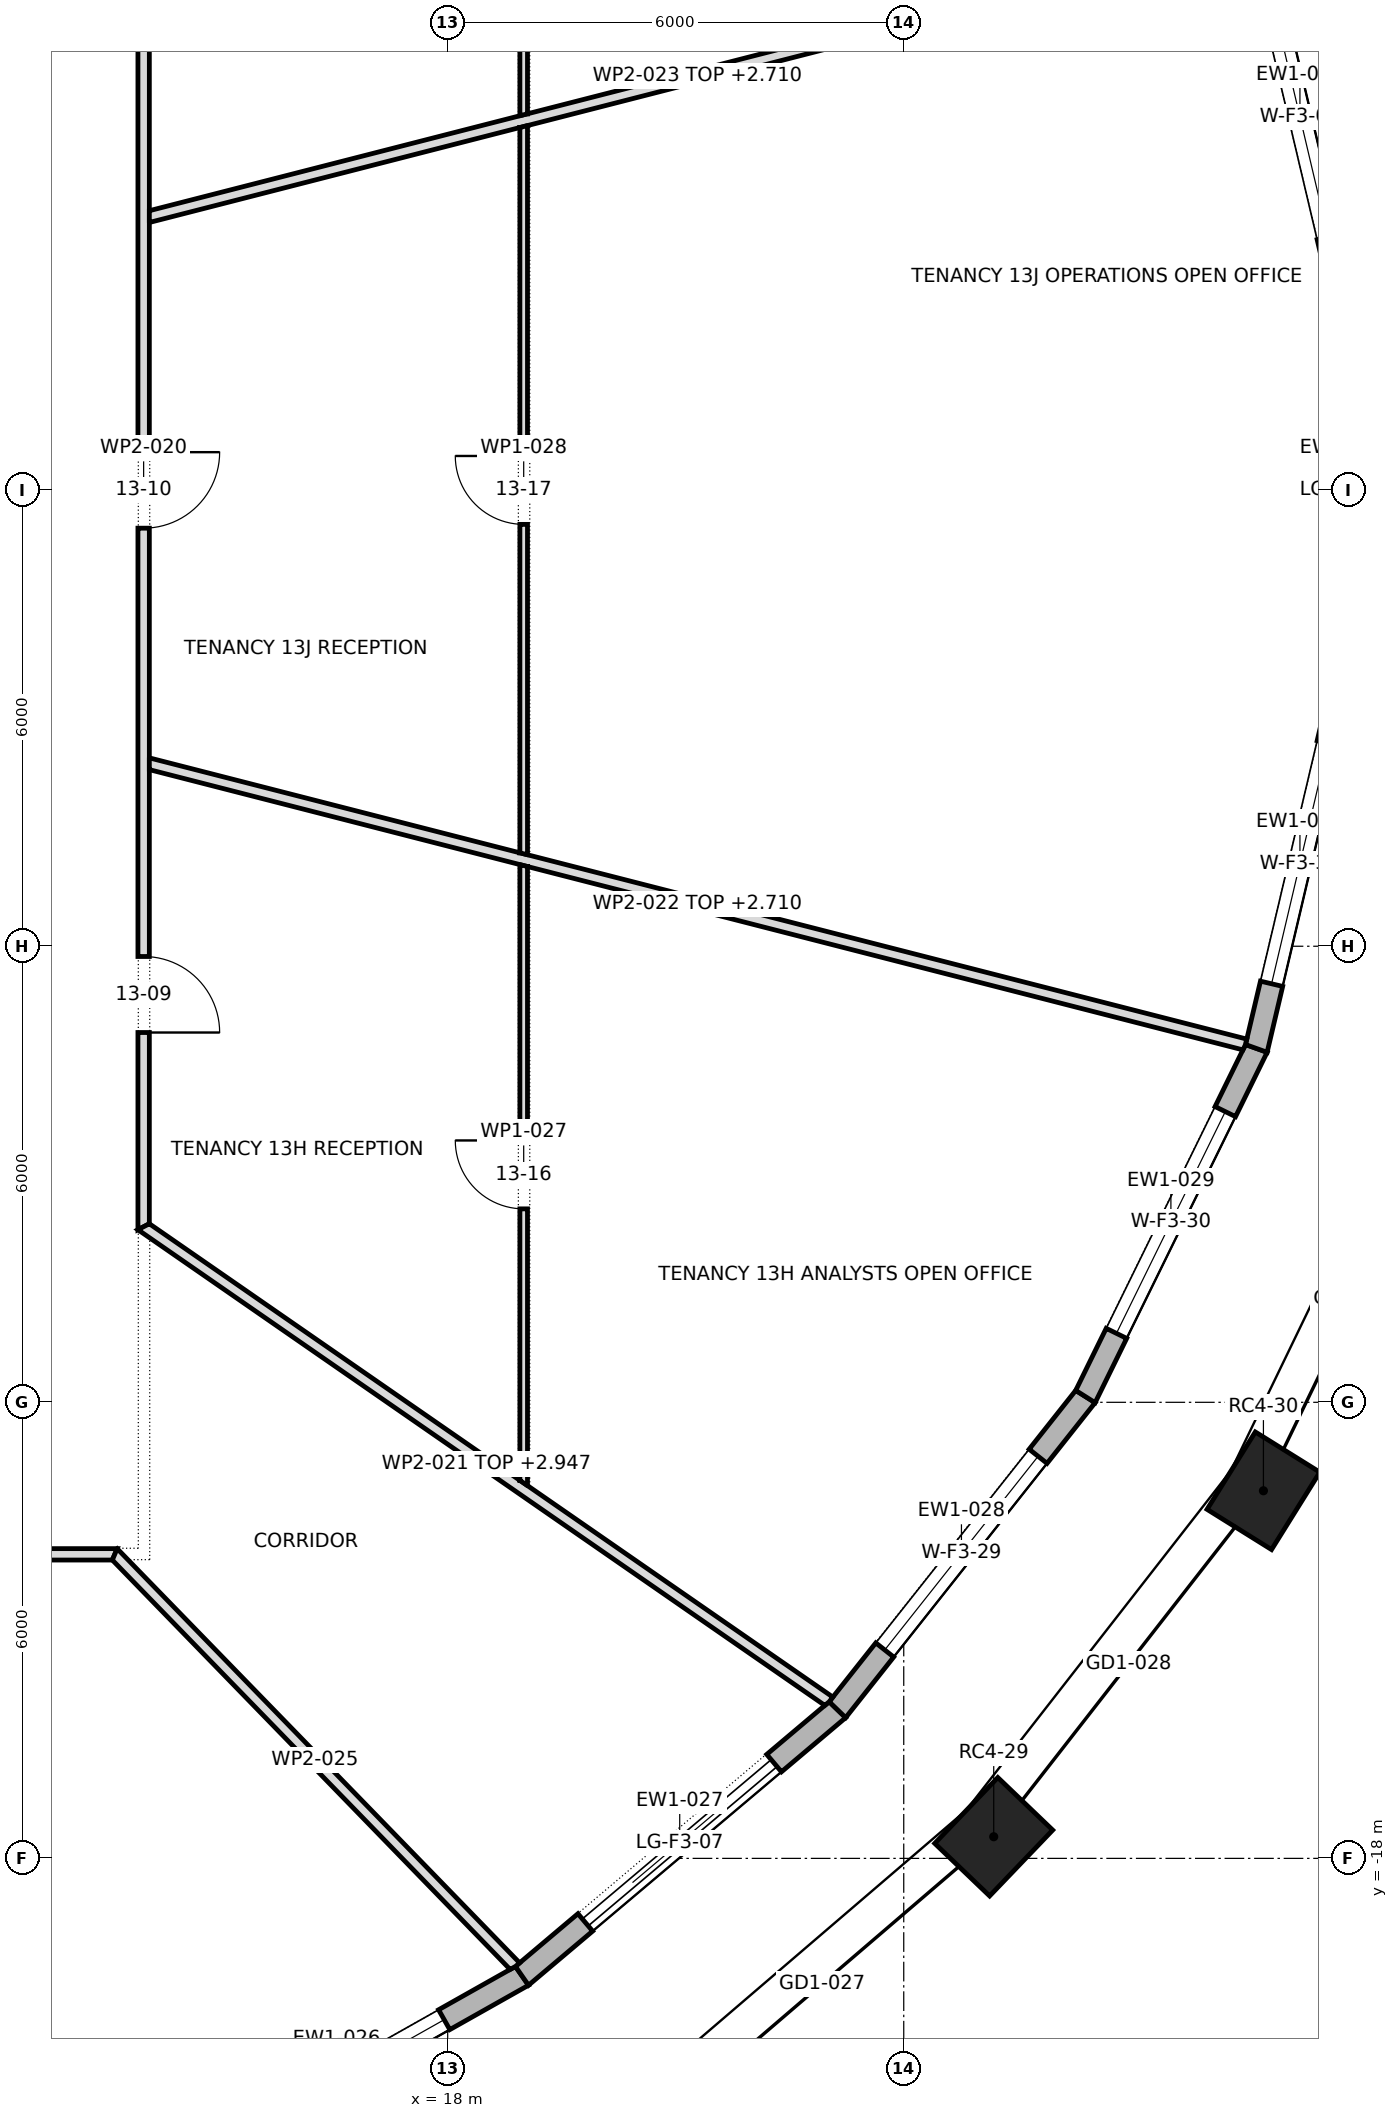
"""IFC4 building model, lengths in metres.
Left out: names, types, materials, properties, quantities, classifications, styles, units other than length and angle.
Written with IfcOpenShell. Run it as: python <this file> out.ifc"""

import sys

from ifc_helpers import new_model, si_unit, direction, frame, frame_2d, origin, origin_2d, place, context, subcontext, project, spatial, polyline, rectangle, outline, extrude, element, fill, save


model = new_model("IFC4")
c1 = context("Model", 3, precision=1e-05, world=origin(), true_north=direction((0.0, 1.0)))
c2 = subcontext(c1, "Body", "Model", "MODEL_VIEW")
j1 = project(units=[si_unit("LENGTHUNIT", "METRE"), si_unit("PLANEANGLEUNIT", "RADIAN")], contexts=[c1])
p1 = place(None, origin())
s1 = spatial("IfcSite", under=j1, at=p1, CompositionType="ELEMENT")
p2 = place(p1, origin())
s2 = spatial("IfcBuilding", under=s1, at=p2, CompositionType="ELEMENT")
p3 = place(p2, frame((0.0, 0.0, 190.9)))
s3 = spatial("IfcBuildingStorey", under=s2, at=p3, CompositionType="ELEMENT", Elevation=190.9)
for number, where, z_axis, x_axis in (
    (1, (25.184, -17.715, 0.0), (0.0, 0.0, 1.0), (0.692, 0.722, 0.0)),
    (2, (28.732, -13.164, 0.0), (0.0, 0.0, 1.0), (0.529, 0.849, 0.0)),
):
    element("IfcColumn", number, at=place(p3, frame(where, z_axis=z_axis, x_axis=x_axis)), inside=s3, PredefinedType="COLUMN", context=c2, shape_type="SweptSolid", body=[
        extrude(rectangle(XDim=1.2, YDim=1.0, at=origin_2d()), origin(), (0.0, 0.0, 1.0), 4.0),
    ])
p4 = place(p3, frame((29.785, 2.48, 0.0), z_axis=(0.0, 0.0, 1.0), x_axis=(-0.229455912692, 0.97331905567, 0.0)))
e3 = element("IfcWall", 3, at=p4, inside=s3, PredefinedType="STANDARD", context=c2, shape_type="SweptSolid", body=[
    extrude(outline(polyline([(-0.017, -0.15), (5.014, -0.15), (4.981, 0.15), (0.017, 0.15), (-0.017, -0.15)])), origin(), (0.0, 0.0, 1.0), 3.7),
])
p5 = place(p4, frame((0.874, 0.0, 0.6)))
e4 = element("IfcOpeningElement", 4, at=p5, cuts=e3, PredefinedType="OPENING", context=c2, shape_type="SweptSolid", body=[
    extrude(rectangle(XDim=3.25, YDim=2.65, at=frame_2d((1.625, 1.325))), frame((0.0, 0.162, 0.0), z_axis=(0.0, -1.0, 0.0), x_axis=(1.0, 0.0, 0.0)), (0.0, 0.0, 1.0), 0.324),
])
p6 = place(p3, frame((14.1, -22.295, 0.0), z_axis=(0.0, 0.0, 1.0), x_axis=(0.871083701819, 0.491134588912, 0.0)))
e5 = element("IfcWall", 5, at=p6, inside=s3, PredefinedType="STANDARD", context=c2, shape_type="SweptSolid", body=[
    extrude(outline(polyline([(-0.013, -0.15), (5.614, -0.15), (5.585, 0.15), (0.013, 0.15), (-0.013, -0.15)])), origin(), (0.0, 0.0, 1.0), 3.7),
])
p7 = place(p6, frame((1.175, 0.0, 0.6)))
e6 = element("IfcOpeningElement", 6, at=p7, cuts=e5, PredefinedType="OPENING", context=c2, shape_type="SweptSolid", body=[
    extrude(rectangle(XDim=3.25, YDim=2.65, at=frame_2d((1.625, 1.325))), frame((0.0, 0.162, 0.0), z_axis=(0.0, -1.0, 0.0), x_axis=(1.0, 0.0, 0.0)), (0.0, 0.0, 1.0), 0.324),
])
p8 = place(p3, frame((18.977, -19.545, 0.0), z_axis=(0.0, 0.0, 1.0), x_axis=(0.764330261608, 0.644824977176, 0.0)))
e7 = element("IfcWall", 7, at=p8, inside=s3, PredefinedType="STANDARD", context=c2, shape_type="SweptSolid", body=[
    extrude(outline(polyline([(-0.014, -0.15), (5.445, -0.15), (5.415, 0.15), (0.014, 0.15), (-0.014, -0.15)])), origin(), (0.0, 0.0, 1.0), 3.7),
])
p9 = place(p8, frame((1.09, 0.0, 0.0)))
e8 = element("IfcOpeningElement", 8, at=p9, cuts=e7, PredefinedType="OPENING", context=c2, shape_type="SweptSolid", body=[
    extrude(rectangle(XDim=3.25, YDim=3.25, at=frame_2d((1.625, 1.625))), frame((0.0, 0.162, 0.0), z_axis=(0.0, -1.0, 0.0), x_axis=(1.0, 0.0, 0.0)), (0.0, 0.0, 1.0), 0.324),
])
p10 = place(p3, frame((23.128, -16.044, 0.0), z_axis=(0.0, 0.0, 1.0), x_axis=(0.620829074232, 0.783945955145, 0.0)))
e9 = element("IfcWall", 9, at=p10, inside=s3, PredefinedType="STANDARD", context=c2, shape_type="SweptSolid", body=[
    extrude(outline(polyline([(-0.015, -0.15), (5.271, -0.15), (5.239, 0.15), (0.015, 0.15), (-0.015, -0.15)])), origin(), (0.0, 0.0, 1.0), 3.7),
])
p11 = place(p10, frame((1.003, 0.0, 0.6)))
e10 = element("IfcOpeningElement", 10, at=p11, cuts=e9, PredefinedType="OPENING", context=c2, shape_type="SweptSolid", body=[
    extrude(rectangle(XDim=3.25, YDim=2.65, at=frame_2d((1.625, 1.325))), frame((0.0, 0.162, 0.0), z_axis=(0.0, -1.0, 0.0), x_axis=(1.0, 0.0, 0.0)), (0.0, 0.0, 1.0), 0.324),
])
p12 = place(p3, frame((26.39, -11.924, 0.0), z_axis=(0.0, 0.0, 1.0), x_axis=(0.440694221881, 0.897657285829, 0.0)))
e11 = element("IfcWall", 11, at=p12, inside=s3, PredefinedType="STANDARD", context=c2, shape_type="SweptSolid", body=[
    extrude(outline(polyline([(-0.016, -0.15), (5.119, -0.15), (5.085, 0.15), (0.016, 0.15), (-0.016, -0.15)])), origin(), (0.0, 0.0, 1.0), 3.7),
])
p13 = place(p12, frame((0.926, 0.0, 0.6)))
e12 = element("IfcOpeningElement", 12, at=p13, cuts=e11, PredefinedType="OPENING", context=c2, shape_type="SweptSolid", body=[
    extrude(rectangle(XDim=3.25, YDim=2.65, at=frame_2d((1.625, 1.325))), frame((0.0, 0.162, 0.0), z_axis=(0.0, -1.0, 0.0), x_axis=(1.0, 0.0, 0.0)), (0.0, 0.0, 1.0), 0.324),
])
p14 = place(p3, frame((28.639, -7.344, 0.0), z_axis=(0.0, 0.0, 1.0), x_axis=(0.229455912692, 0.97331905567, 0.0)))
e13 = element("IfcWall", 13, at=p14, inside=s3, PredefinedType="STANDARD", context=c2, shape_type="SweptSolid", body=[
    extrude(outline(polyline([(-0.017, -0.15), (5.015, -0.15), (4.98, 0.15), (0.017, 0.15), (-0.017, -0.15)])), origin(), (0.0, 0.0, 1.0), 3.7),
])
p15 = place(p14, frame((0.874, 0.0, 0.6)))
e14 = element("IfcOpeningElement", 14, at=p15, cuts=e13, PredefinedType="OPENING", context=c2, shape_type="SweptSolid", body=[
    extrude(rectangle(XDim=3.25, YDim=2.65, at=frame_2d((1.625, 1.325))), frame((0.0, 0.162, 0.0), z_axis=(0.0, -1.0, 0.0), x_axis=(1.0, 0.0, 0.0)), (0.0, 0.0, 1.0), 0.324),
])
p16 = place(p3, frame((-1.63, -14.0, 0.0), z_axis=(0.0, 0.0, 1.0), x_axis=(1.0, 0.0, 0.0)))
e15 = element("IfcWall", 15, at=p16, inside=s3, PredefinedType="PARTITIONING", context=c2, shape_type="SweptSolid", body=[
    extrude(outline(polyline([(0.0, -0.075), (1.902, -0.075), (3.804, -0.075), (5.707, -0.075), (7.609, -0.075), (9.511, -0.075), (11.414, -0.075), (13.316, -0.075), (15.218, -0.075), (15.281, 0.075), (15.281, 0.075), (13.371, 0.075), (11.461, 0.075), (9.551, 0.075), (7.641, 0.075), (5.73, 0.075), (3.82, 0.075), (1.91, 0.075), (0.0, 0.075), (0.0, -0.075)])), origin(), (0.0, 0.0, 1.0), 3.7),
])
p17 = place(p16, frame((2.83, 0.0, 0.0)))
e16 = element("IfcOpeningElement", 16, at=p17, cuts=e15, PredefinedType="OPENING", context=c2, shape_type="SweptSolid", body=[
    extrude(rectangle(XDim=1.0, YDim=2.1, at=frame_2d((0.5, 1.05))), frame((0.0, 0.087, 0.0), z_axis=(0.0, -1.0, 0.0), x_axis=(1.0, 0.0, 0.0)), (0.0, 0.0, 1.0), 0.174),
])
p18 = place(p16, frame((10.455, 0.0, 0.0)))
e17 = element("IfcOpeningElement", 17, at=p18, cuts=e15, PredefinedType="OPENING", context=c2, shape_type="SweptSolid", body=[
    extrude(rectangle(XDim=1.0, YDim=2.1, at=frame_2d((0.5, 1.05))), frame((0.0, 0.087, 0.0), z_axis=(0.0, -1.0, 0.0), x_axis=(1.0, 0.0, 0.0)), (0.0, 0.0, 1.0), 0.174),
])
p19 = place(p3, frame((14.0, -9.729, 0.0), z_axis=(0.0, 0.0, 1.0), x_axis=(0.0, 1.0, 0.0)))
e18 = element("IfcWall", 18, at=p19, inside=s3, PredefinedType="PARTITIONING", context=c2, shape_type="SweptSolid", body=[
    extrude(outline(polyline([(0.079, -0.075), (2.009, -0.075), (3.939, -0.075), (5.869, -0.075), (7.799, -0.075), (9.729, -0.075), (11.659, -0.075), (13.59, -0.075), (15.52, -0.075), (17.45, -0.075), (19.38, -0.075), (19.458, 0.075), (19.458, 0.075), (17.513, 0.075), (15.567, 0.075), (13.621, 0.075), (11.675, 0.075), (9.729, 0.075), (7.783, 0.075), (5.838, 0.075), (3.892, 0.075), (1.946, 0.075), (0.0, 0.075), (0.0, 0.075), (0.079, -0.075)])), origin(), (0.0, 0.0, 1.0), 3.7),
])
p20 = place(p19, frame((2.594, 0.0, 0.0)))
e19 = element("IfcOpeningElement", 19, at=p20, cuts=e18, PredefinedType="OPENING", context=c2, shape_type="SweptSolid", body=[
    extrude(rectangle(XDim=1.0, YDim=2.1, at=frame_2d((0.5, 1.05))), frame((0.0, 0.087, 0.0), z_axis=(0.0, -1.0, 0.0), x_axis=(1.0, 0.0, 0.0)), (0.0, 0.0, 1.0), 0.174),
])
p21 = place(p19, frame((9.229, 0.0, 0.0)))
e20 = element("IfcOpeningElement", 20, at=p21, cuts=e18, PredefinedType="OPENING", context=c2, shape_type="SweptSolid", body=[
    extrude(rectangle(XDim=1.0, YDim=2.1, at=frame_2d((0.5, 1.05))), frame((0.0, 0.087, 0.0), z_axis=(0.0, -1.0, 0.0), x_axis=(1.0, 0.0, 0.0)), (0.0, 0.0, 1.0), 0.174),
])
p22 = place(p19, frame((15.864, 0.0, 0.0)))
e21 = element("IfcOpeningElement", 21, at=p22, cuts=e18, PredefinedType="OPENING", context=c2, shape_type="SweptSolid", body=[
    extrude(rectangle(XDim=1.0, YDim=2.1, at=frame_2d((0.5, 1.05))), frame((0.0, 0.087, 0.0), z_axis=(0.0, -1.0, 0.0), x_axis=(1.0, 0.0, 0.0)), (0.0, 0.0, 1.0), 0.174),
])
p23 = place(p3, frame((13.968, -9.667, 0.0), z_axis=(0.0, 0.0, 1.0), x_axis=(0.822097241007, -0.569347105313, 0.0)))
e22 = element("IfcWall", 22, at=p23, inside=s3, PredefinedType="PARTITIONING", context=c2, shape_type="SweptSolid", body=[
    extrude(outline(polyline([(0.0, -0.075), (1.832, -0.075), (3.664, -0.075), (5.496, -0.075), (7.328, -0.075), (9.16, -0.075), (10.992, -0.075), (11.012, -0.002), (11.017, 0.07), (11.017, 0.075), (9.349, 0.075), (7.682, 0.075), (6.014, 0.075), (6.01, 0.072), (6.009, 0.075), (4.032, 0.075), (2.055, 0.075), (0.079, 0.075), (0.039, -0.0), (0.0, -0.075)])), origin(), (0.0, 0.0, 1.0), 2.947),
])
p24 = place(p3, frame((14.057, -3.594, 0.0), z_axis=(0.0, 0.0, 1.0), x_axis=(0.96870063855, -0.248231893342, 0.0)))
e23 = element("IfcWall", 23, at=p24, inside=s3, PredefinedType="PARTITIONING", context=c2, shape_type="SweptSolid", body=[
    extrude(outline(polyline([(0.038, -0.075), (1.748, -0.075), (3.458, -0.075), (5.168, -0.075), (5.174, -0.073), (5.174, -0.075), (7.117, -0.075), (9.061, -0.075), (11.004, -0.075), (12.947, -0.075), (14.89, -0.075), (14.904, -0.008), (14.904, 0.075), (12.931, 0.075), (10.958, 0.075), (8.985, 0.075), (7.011, 0.075), (5.038, 0.075), (5.033, 0.073), (5.032, 0.075), (3.355, 0.075), (1.677, 0.075), (0.0, 0.075), (0.0, 0.074), (0.038, -0.075)])), origin(), (0.0, 0.0, 1.0), 2.71),
])
p25 = place(p3, frame((14.057, 3.594, 0.0), z_axis=(0.0, 0.0, 1.0), x_axis=(0.96870063855, 0.248231893342, 0.0)))
e24 = element("IfcWall", 24, at=p25, inside=s3, PredefinedType="PARTITIONING", context=c2, shape_type="SweptSolid", body=[
    extrude(outline(polyline([(0.0, -0.075), (1.677, -0.075), (3.355, -0.075), (5.032, -0.075), (5.033, -0.073), (5.038, -0.075), (7.011, -0.075), (8.985, -0.075), (10.958, -0.075), (12.931, -0.075), (14.904, -0.075), (14.904, 0.008), (14.89, 0.075), (12.947, 0.075), (11.004, 0.075), (9.061, 0.075), (7.117, 0.075), (5.174, 0.075), (5.174, 0.073), (5.168, 0.075), (3.458, 0.075), (1.748, 0.075), (0.038, 0.075), (0.0, -0.074), (0.0, -0.075)])), origin(), (0.0, 0.0, 1.0), 2.71),
])
p26 = place(p3, frame((18.893, -19.427, 0.0), z_axis=(0.0, 0.0, 1.0), x_axis=(-0.696864554069, 0.717202756048, 0.0)))
e25 = element("IfcWall", 25, at=p26, inside=s3, PredefinedType="PARTITIONING", context=c2, shape_type="SweptSolid", body=[
    extrude(outline(polyline([(0.0, -0.075), (1.9, -0.075), (3.799, -0.075), (5.699, -0.075), (7.599, -0.075), (7.567, 0.0), (7.535, 0.075), (5.658, 0.075), (3.78, 0.075), (1.903, 0.075), (0.025, 0.075), (0.005, -0.003), (0.0, -0.073), (0.0, -0.075)])), origin(), (0.0, 0.0, 1.0), 3.7),
])
p27 = place(p3, frame((19.0, -4.926, 0.0), z_axis=(0.0, 0.0, 1.0), x_axis=(0.0, -1.0, 0.0)))
e26 = element("IfcWall", 26, at=p27, inside=s3, PredefinedType="PARTITIONING", context=c2, shape_type="SweptSolid", body=[
    extrude(outline(polyline([(0.0, -0.05), (1.62, -0.05), (3.24, -0.05), (4.86, -0.05), (6.481, -0.05), (8.101, -0.05), (8.169, 0.049), (8.169, 0.05), (6.541, 0.05), (4.912, 0.05), (3.283, 0.05), (1.654, 0.05), (0.025, 0.05), (0.0, -0.049), (0.0, -0.05)])), origin(), (0.0, 0.0, 1.0), 3.7),
])
p28 = place(p27, frame((3.629, 0.0, 0.0)))
e27 = element("IfcOpeningElement", 27, at=p28, cuts=e26, PredefinedType="OPENING", context=c2, shape_type="SweptSolid", body=[
    extrude(rectangle(XDim=0.9, YDim=2.1, at=frame_2d((0.45, 1.05))), frame((0.0, 0.062, 0.0), z_axis=(0.0, -1.0, 0.0), x_axis=(1.0, 0.0, 0.0)), (0.0, 0.0, 1.0), 0.124),
])
p29 = place(p3, frame((19.0, 4.796, 0.0), z_axis=(0.0, 0.0, 1.0), x_axis=(0.0, -1.0, 0.0)))
e28 = element("IfcWall", 28, at=p29, inside=s3, PredefinedType="PARTITIONING", context=c2, shape_type="SweptSolid", body=[
    extrude(outline(polyline([(0.025, -0.05), (1.934, -0.05), (3.842, -0.05), (5.75, -0.05), (7.659, -0.05), (9.567, -0.05), (9.593, 0.049), (9.593, 0.05), (7.674, 0.05), (5.756, 0.05), (3.837, 0.05), (1.918, 0.05), (0.0, 0.05), (0.0, 0.049), (0.025, -0.05)])), origin(), (0.0, 0.0, 1.0), 3.7),
])
p30 = place(p29, frame((4.346, 0.0, 0.0)))
e29 = element("IfcOpeningElement", 29, at=p30, cuts=e28, PredefinedType="OPENING", context=c2, shape_type="SweptSolid", body=[
    extrude(rectangle(XDim=0.9, YDim=2.1, at=frame_2d((0.45, 1.05))), frame((0.0, 0.062, 0.0), z_axis=(0.0, -1.0, 0.0), x_axis=(1.0, 0.0, 0.0)), (0.0, 0.0, 1.0), 0.124),
])
p31 = place(p3, frame((19.0, 13.093, 0.0), z_axis=(0.0, 0.0, 1.0), x_axis=(0.0, -1.0, 0.0)))
e30 = element("IfcWall", 30, at=p31, inside=s3, PredefinedType="PARTITIONING", context=c2, shape_type="SweptSolid", body=[
    extrude(outline(polyline([(8.167, -0.05), (8.167, -0.049), (8.142, 0.05), (6.513, 0.05), (4.885, 0.05), (3.257, 0.05), (1.628, 0.05), (0.0, 0.05), (0.0, 0.05), (0.069, -0.05), (1.688, -0.05), (3.308, -0.05), (4.928, -0.05), (6.547, -0.05), (8.167, -0.05)])), origin(), (0.0, 0.0, 1.0), 3.7),
])
p32 = place(p31, frame((3.638, 0.0, 0.0)))
e31 = element("IfcOpeningElement", 31, at=p32, cuts=e30, PredefinedType="OPENING", context=c2, shape_type="SweptSolid", body=[
    extrude(rectangle(XDim=0.9, YDim=2.1, at=frame_2d((0.45, 1.05))), frame((0.0, 0.062, 0.0), z_axis=(0.0, -1.0, 0.0), x_axis=(1.0, 0.0, 0.0)), (0.0, 0.0, 1.0), 0.124),
])
p33 = place(p5, origin())
e32 = element("IfcWindow", 32, at=p33, inside=s3, PartitioningType="TRIPLE_PANEL_VERTICAL", PredefinedType="WINDOW", context=c2, shape_type="SweptSolid", body=[
    extrude(rectangle(XDim=3.25, YDim=2.65, at=frame_2d((1.625, 1.325))), frame((0.0, 0.03, 0.0), z_axis=(0.0, -1.0, 0.0), x_axis=(1.0, 0.0, 0.0)), (0.0, 0.0, 1.0), 0.06),
])
fill(e4, e32)
p34 = place(p7, origin())
e33 = element("IfcWindow", 33, at=p34, inside=s3, PartitioningType="TRIPLE_PANEL_VERTICAL", PredefinedType="WINDOW", context=c2, shape_type="SweptSolid", body=[
    extrude(rectangle(XDim=3.25, YDim=2.65, at=frame_2d((1.625, 1.325))), frame((0.0, 0.03, 0.0), z_axis=(0.0, -1.0, 0.0), x_axis=(1.0, 0.0, 0.0)), (0.0, 0.0, 1.0), 0.06),
])
fill(e6, e33)
p35 = place(p9, origin())
e34 = element("IfcDoor", 34, at=p35, inside=s3, OperationType="DOUBLE_DOOR_SLIDING", PredefinedType="DOOR", context=c2, shape_type="SweptSolid", body=[
    extrude(rectangle(XDim=3.25, YDim=3.25, at=frame_2d((1.625, 1.625))), frame((0.0, 0.025, 0.0), z_axis=(0.0, -1.0, 0.0), x_axis=(1.0, 0.0, 0.0)), (0.0, 0.0, 1.0), 0.05),
])
fill(e8, e34)
p36 = place(p11, origin())
e35 = element("IfcWindow", 35, at=p36, inside=s3, PartitioningType="TRIPLE_PANEL_VERTICAL", PredefinedType="WINDOW", context=c2, shape_type="SweptSolid", body=[
    extrude(rectangle(XDim=3.25, YDim=2.65, at=frame_2d((1.625, 1.325))), frame((0.0, 0.03, 0.0), z_axis=(0.0, -1.0, 0.0), x_axis=(1.0, 0.0, 0.0)), (0.0, 0.0, 1.0), 0.06),
])
fill(e10, e35)
p37 = place(p13, origin())
e36 = element("IfcWindow", 36, at=p37, inside=s3, PartitioningType="TRIPLE_PANEL_VERTICAL", PredefinedType="WINDOW", context=c2, shape_type="SweptSolid", body=[
    extrude(rectangle(XDim=3.25, YDim=2.65, at=frame_2d((1.625, 1.325))), frame((0.0, 0.03, 0.0), z_axis=(0.0, -1.0, 0.0), x_axis=(1.0, 0.0, 0.0)), (0.0, 0.0, 1.0), 0.06),
])
fill(e12, e36)
p38 = place(p15, origin())
e37 = element("IfcWindow", 37, at=p38, inside=s3, PartitioningType="TRIPLE_PANEL_VERTICAL", PredefinedType="WINDOW", context=c2, shape_type="SweptSolid", body=[
    extrude(rectangle(XDim=3.25, YDim=2.65, at=frame_2d((1.625, 1.325))), frame((0.0, 0.03, 0.0), z_axis=(0.0, -1.0, 0.0), x_axis=(1.0, 0.0, 0.0)), (0.0, 0.0, 1.0), 0.06),
])
fill(e14, e37)
p39 = place(p20, frame((1.0, 0.0, 0.0), z_axis=(0.0, 0.0, 1.0), x_axis=(-1.0, 0.0, 0.0)))
e38 = element("IfcDoor", 38, at=p39, inside=s3, OperationType="SINGLE_SWING_LEFT", PredefinedType="DOOR", context=c2, shape_type="SweptSolid", body=[
    extrude(rectangle(XDim=1.0, YDim=2.1, at=frame_2d((0.5, 1.05))), frame((0.0, 0.025, 0.0), z_axis=(0.0, -1.0, 0.0), x_axis=(1.0, 0.0, 0.0)), (0.0, 0.0, 1.0), 0.05),
])
fill(e19, e38)
p40 = place(p21, frame((1.0, 0.0, 0.0), z_axis=(0.0, 0.0, 1.0), x_axis=(-1.0, 0.0, 0.0)))
e39 = element("IfcDoor", 39, at=p40, inside=s3, OperationType="SINGLE_SWING_RIGHT", PredefinedType="DOOR", context=c2, shape_type="SweptSolid", body=[
    extrude(rectangle(XDim=1.0, YDim=2.1, at=frame_2d((0.5, 1.05))), frame((0.0, 0.025, 0.0), z_axis=(0.0, -1.0, 0.0), x_axis=(1.0, 0.0, 0.0)), (0.0, 0.0, 1.0), 0.05),
])
fill(e20, e39)
p41 = place(p28, frame((0.9, 0.0, 0.0), z_axis=(0.0, 0.0, 1.0), x_axis=(-1.0, 0.0, 0.0)))
e40 = element("IfcDoor", 40, at=p41, inside=s3, OperationType="SINGLE_SWING_LEFT", PredefinedType="DOOR", context=c2, shape_type="SweptSolid", body=[
    extrude(rectangle(XDim=0.9, YDim=2.1, at=frame_2d((0.45, 1.05))), frame((0.0, 0.025, 0.0), z_axis=(0.0, -1.0, 0.0), x_axis=(1.0, 0.0, 0.0)), (0.0, 0.0, 1.0), 0.05),
])
fill(e27, e40)
p42 = place(p30, frame((0.9, 0.0, 0.0), z_axis=(0.0, 0.0, 1.0), x_axis=(-1.0, 0.0, 0.0)))
e41 = element("IfcDoor", 41, at=p42, inside=s3, OperationType="SINGLE_SWING_LEFT", PredefinedType="DOOR", context=c2, shape_type="SweptSolid", body=[
    extrude(rectangle(XDim=0.9, YDim=2.1, at=frame_2d((0.45, 1.05))), frame((0.0, 0.025, 0.0), z_axis=(0.0, -1.0, 0.0), x_axis=(1.0, 0.0, 0.0)), (0.0, 0.0, 1.0), 0.05),
])
fill(e29, e41)
save(model, sys.argv[1])
